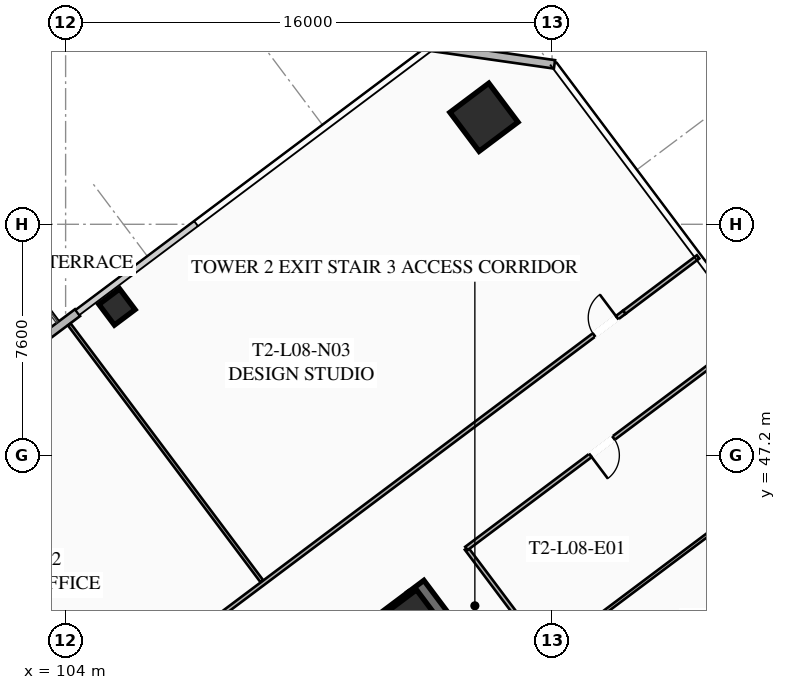
"""IFC4 building model, lengths in metres.
Left out: names, types, materials, properties, quantities, classifications, styles, units other than length and angle.
Written with IfcOpenShell. Run it as: python <this file> out.ifc"""

import sys

from ifc_helpers import new_model, si_unit, direction, frame, frame_2d, origin, origin_2d, place, context, subcontext, project, spatial, rectangle, hollow_rectangle, extrude, element, fill, save


model = new_model("IFC4")
c1 = context("Model", 3, precision=1e-05, world=origin(), true_north=direction((0.0, 1.0)))
c2 = subcontext(c1, "Body", "Model", "MODEL_VIEW")
j1 = project(units=[si_unit("LENGTHUNIT", "METRE"), si_unit("PLANEANGLEUNIT", "RADIAN")], contexts=[c1])
p1 = place(None, origin())
s1 = spatial("IfcSite", under=j1, at=p1, CompositionType="ELEMENT")
p2 = place(p1, origin())
s2 = spatial("IfcBuilding", under=s1, at=p2, CompositionType="ELEMENT")
p3 = place(p2, frame((0.0, 0.0, 35.25)))
s3 = spatial("IfcBuildingStorey", under=s2, at=p3, CompositionType="ELEMENT", Elevation=35.25)
p4 = place(p3, frame((115.524, 42.893, 0.0), z_axis=(0.0, 0.0, 1.0), x_axis=(0.600005007985, -0.799996243986, 0.0)))
e1 = element("IfcWall", 1, at=p4, inside=s3, PredefinedType="SHEAR", context=c2, shape_type="SweptSolid", body=[
    extrude(rectangle(XDim=15.6, YDim=0.65, at=frame_2d((7.8, 0.0))), origin(), (0.0, 0.0, 1.0), 3.55),
])
p5 = place(p3, frame((103.571, 33.522, 0.0), z_axis=(0.0, 0.0, 1.0), x_axis=(0.799998028465, 0.600002628705, 0.0)))
e2 = element("IfcWall", 2, at=p5, inside=s3, PredefinedType="SHEAR", context=c2, shape_type="SweptSolid", body=[
    extrude(rectangle(XDim=14.86, YDim=0.65, at=frame_2d((7.43, 0.0))), origin(), (0.0, 0.0, 1.0), 3.55),
])
p6 = place(p5, frame((4.48, 0.0, 0.0)))
e3 = element("IfcOpeningElement", 3, at=p6, cuts=e2, PredefinedType="OPENING", context=c2, shape_type="SweptSolid", body=[
    extrude(rectangle(XDim=1.25, YDim=2.25, at=frame_2d((0.625, 1.125))), frame((0.0, 0.335, 0.0), z_axis=(0.0, -1.0, 0.0), x_axis=(1.0, 0.0, 0.0)), (0.0, 0.0, 1.0), 0.67),
])
p7 = place(p5, frame((9.53, 0.0, 0.0)))
e4 = element("IfcOpeningElement", 4, at=p7, cuts=e2, PredefinedType="OPENING", context=c2, shape_type="SweptSolid", body=[
    extrude(rectangle(XDim=1.25, YDim=2.25, at=frame_2d((0.625, 1.125))), frame((0.0, 0.335, 0.0), z_axis=(0.0, -1.0, 0.0), x_axis=(1.0, 0.0, 0.0)), (0.0, 0.0, 1.0), 0.67),
])
p8 = place(p3, frame((115.41, 41.87, 0.0), z_axis=(0.0, 0.0, 1.0), x_axis=(0.799999996291, 0.600000004945, 0.0)))
e5 = element("IfcColumn", 5, at=p8, inside=s3, PredefinedType="COLUMN", context=c2, shape_type="SweptSolid", body=[
    extrude(hollow_rectangle(XDim=1.3, YDim=1.3, WallThickness=0.05, at=origin_2d()), origin(), (0.0, 0.0, 1.0), 3.35),
])
p9 = place(p3, frame((117.76, 58.32, 0.0), z_axis=(0.0, 0.0, 1.0), x_axis=(0.799999996291, 0.600000004945, 0.0)))
e6 = element("IfcColumn", 6, at=p9, inside=s3, PredefinedType="COLUMN", context=c2, shape_type="SweptSolid", body=[
    extrude(hollow_rectangle(XDim=1.6, YDim=1.6, WallThickness=0.06, at=origin_2d()), origin(), (0.0, 0.0, 1.0), 3.35),
])
p10 = place(p3, frame((105.69, 52.08, 0.0), z_axis=(0.0, 0.0, 1.0), x_axis=(0.799999996291, 0.600000004945, 0.0)))
e7 = element("IfcColumn", 7, at=p10, inside=s3, PredefinedType="COLUMN", context=c2, shape_type="SweptSolid", body=[
    extrude(hollow_rectangle(XDim=0.85, YDim=0.85, WallThickness=0.035, at=origin_2d()), origin(), (0.0, 0.0, 1.0), 3.35),
])
p11 = place(p3, frame((97.592, 46.794, 0.0), z_axis=(0.0, 0.0, 1.0), x_axis=(0.799996553335, 0.600004595526, 0.0)))
e8 = element("IfcWall", 8, at=p11, inside=s3, PredefinedType="SOLIDWALL", context=c2, shape_type="SweptSolid", body=[
    extrude(rectangle(XDim=8.5, YDim=0.28, at=frame_2d((4.25, 0.0))), origin(), (0.0, 0.0, 1.0), 3.35),
])
p12 = place(p11, frame((3.6, 0.0, 0.0)))
e9 = element("IfcOpeningElement", 9, at=p12, cuts=e8, PredefinedType="OPENING", context=c2, shape_type="SweptSolid", body=[
    extrude(rectangle(XDim=1.3, YDim=2.15, at=frame_2d((0.65, 1.075))), frame((0.0, 0.15, 0.0), z_axis=(0.0, -1.0, 0.0), x_axis=(1.0, 0.0, 0.0)), (0.0, 0.0, 1.0), 0.3),
])
p13 = place(p11, frame((1.46, 0.0, 0.85)))
e10 = element("IfcOpeningElement", 10, at=p13, cuts=e8, PredefinedType="OPENING", context=c2, shape_type="SweptSolid", body=[
    extrude(rectangle(XDim=1.8, YDim=1.92, at=frame_2d((0.9, 0.96))), frame((0.0, 0.15, 0.0), z_axis=(0.0, -1.0, 0.0), x_axis=(1.0, 0.0, 0.0)), (0.0, 0.0, 1.0), 0.3),
])
p14 = place(p3, frame((116.02, 60.64, 0.0), z_axis=(0.0, 0.0, 1.0), x_axis=(0.989955445613, -0.14137968631, 0.0)))
e11 = element("IfcWall", 11, at=p14, inside=s3, PredefinedType="SOLIDWALL", context=c2, shape_type="SweptSolid", body=[
    extrude(rectangle(XDim=4.101, YDim=0.28, at=frame_2d((2.051, 0.0))), origin(), (0.0, 0.0, 1.0), 3.35),
])
p15 = place(p3, frame((119.824, 40.618, 0.0), z_axis=(0.0, 0.0, 1.0), x_axis=(-0.599982243973, 0.800013316712, 0.0)))
e12 = element("IfcWall", 12, at=p15, inside=s3, PredefinedType="PARTITIONING", context=c2, shape_type="SweptSolid", body=[
    extrude(rectangle(XDim=4.4, YDim=0.135, at=frame_2d((2.2, 0.0))), origin(), (0.0, 0.0, 1.0), 2.703),
])
p16 = place(p3, frame((98.516, 34.012, 0.0), z_axis=(0.0, 0.0, 1.0), x_axis=(0.799998035726, 0.600002619023, 0.0)))
e13 = element("IfcWall", 13, at=p16, inside=s3, PredefinedType="PARTITIONING", context=c2, shape_type="SweptSolid", body=[
    extrude(rectangle(XDim=29.83, YDim=0.135, at=frame_2d((14.915, 0.0))), origin(), (0.0, 0.0, 1.0), 2.703),
])
p17 = place(p16, frame((0.3, 0.0, 0.0)))
e14 = element("IfcOpeningElement", 14, at=p17, cuts=e13, PredefinedType="OPENING", context=c2, shape_type="SweptSolid", body=[
    extrude(rectangle(XDim=0.95, YDim=2.05, at=frame_2d((0.475, 1.025))), frame((0.0, 0.077, 0.0), z_axis=(0.0, -1.0, 0.0), x_axis=(1.0, 0.0, 0.0)), (0.0, 0.0, 1.0), 0.155),
])
p18 = place(p16, frame((10.829, 0.0, 0.0)))
e15 = element("IfcOpeningElement", 15, at=p18, cuts=e13, PredefinedType="OPENING", context=c2, shape_type="SweptSolid", body=[
    extrude(rectangle(XDim=0.95, YDim=2.05, at=frame_2d((0.475, 1.025))), frame((0.0, 0.077, 0.0), z_axis=(0.0, -1.0, 0.0), x_axis=(1.0, 0.0, 0.0)), (0.0, 0.0, 1.0), 0.155),
])
p19 = place(p16, frame((28.58, 0.0, 0.0)))
e16 = element("IfcOpeningElement", 16, at=p19, cuts=e13, PredefinedType="OPENING", context=c2, shape_type="SweptSolid", body=[
    extrude(rectangle(XDim=0.95, YDim=2.05, at=frame_2d((0.475, 1.025))), frame((0.0, 0.077, 0.0), z_axis=(0.0, -1.0, 0.0), x_axis=(1.0, 0.0, 0.0)), (0.0, 0.0, 1.0), 0.155),
])
p20 = place(p3, frame((122.38, 51.91, 0.0), z_axis=(0.0, 0.0, 1.0), x_axis=(0.799990331366, 0.600012891296, 0.0)))
e17 = element("IfcWall", 17, at=p20, inside=s3, PredefinedType="PARTITIONING", context=c2, shape_type="SweptSolid", body=[
    extrude(rectangle(XDim=3.03, YDim=0.135, at=frame_2d((1.515, 0.0))), origin(), (0.0, 0.0, 1.0), 2.703),
])
p21 = place(p3, frame((110.452, 43.064, 0.0), z_axis=(0.0, 0.0, 1.0), x_axis=(-0.599992594658, 0.800005553953, 0.0)))
e18 = element("IfcWall", 18, at=p21, inside=s3, PredefinedType="PARTITIONING", context=c2, shape_type="SweptSolid", body=[
    extrude(rectangle(XDim=10.55, YDim=0.11, at=frame_2d((5.275, 0.0))), origin(), (0.0, 0.0, 1.0), 2.703),
])
p22 = place(p3, frame((126.664, 51.248, 0.0), z_axis=(0.0, 0.0, 1.0), x_axis=(-0.799995055373, -0.600006592779, 0.0)))
e19 = element("IfcWall", 19, at=p22, inside=s3, PredefinedType="PARTITIONING", context=c2, shape_type="SweptSolid", body=[
    extrude(rectangle(XDim=11.85, YDim=0.135, at=frame_2d((5.925, 0.0))), origin(), (0.0, 0.0, 1.0), 2.703),
])
p23 = place(p22, frame((5.8, 0.0, 0.0)))
e20 = element("IfcOpeningElement", 20, at=p23, cuts=e19, PredefinedType="OPENING", context=c2, shape_type="SweptSolid", body=[
    extrude(rectangle(XDim=0.95, YDim=2.05, at=frame_2d((0.475, 1.025))), frame((0.0, 0.077, 0.0), z_axis=(0.0, -1.0, 0.0), x_axis=(1.0, 0.0, 0.0)), (0.0, 0.0, 1.0), 0.155),
])
p24 = place(p3, frame((129.304, 47.728, 0.0), z_axis=(0.0, 0.0, 1.0), x_axis=(-0.8, -0.6, 0.0)))
e21 = element("IfcWall", 21, at=p24, inside=s3, PredefinedType="PARTITIONING", context=c2, shape_type="SweptSolid", body=[
    extrude(rectangle(XDim=10.0, YDim=0.11, at=frame_2d((5.0, 0.0))), origin(), (0.0, 0.0, 1.0), 2.703),
])
p25 = place(p19, origin())
e22 = element("IfcDoor", 22, at=p25, inside=s3, OperationType="SINGLE_SWING_RIGHT", PredefinedType="DOOR", context=c2, shape_type="SweptSolid", body=[
    extrude(rectangle(XDim=0.95, YDim=2.05, at=frame_2d((0.475, 1.025))), frame((0.0, 0.025, 0.0), z_axis=(0.0, -1.0, 0.0), x_axis=(1.0, 0.0, 0.0)), (0.0, 0.0, 1.0), 0.05),
])
fill(e16, e22)
p26 = place(p23, origin())
e23 = element("IfcDoor", 23, at=p26, inside=s3, OperationType="SINGLE_SWING_RIGHT", PredefinedType="DOOR", context=c2, shape_type="SweptSolid", body=[
    extrude(rectangle(XDim=0.95, YDim=2.05, at=frame_2d((0.475, 1.025))), frame((0.0, 0.025, 0.0), z_axis=(0.0, -1.0, 0.0), x_axis=(1.0, 0.0, 0.0)), (0.0, 0.0, 1.0), 0.05),
])
fill(e20, e23)
save(model, sys.argv[1])
